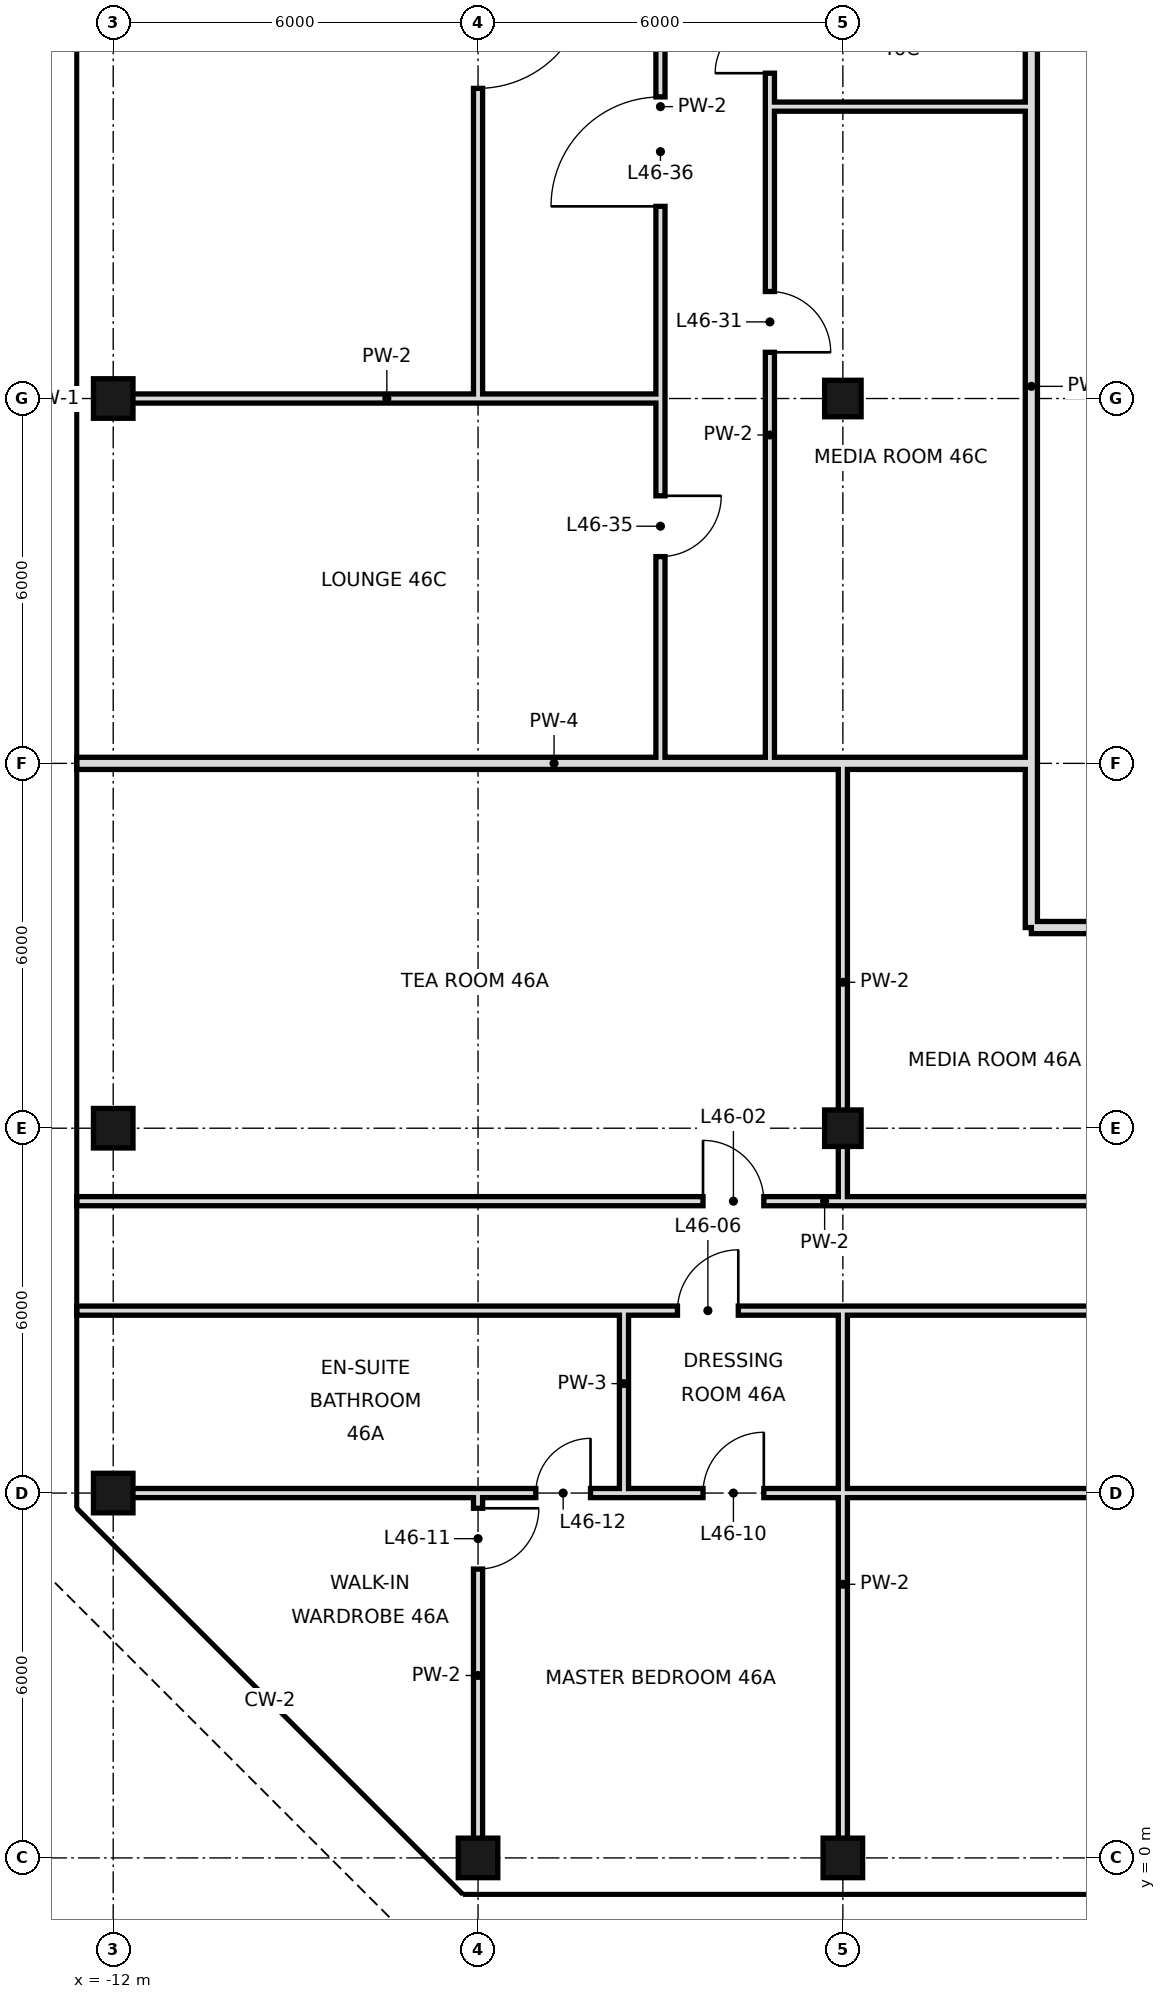
"""IFC4 building model, lengths in metres.
Left out: names, types, materials, properties, quantities, classifications, styles, units other than length and angle.
Written with IfcOpenShell. Run it as: python <this file> out.ifc"""

import sys

from ifc_helpers import new_model, si_unit, direction, frame, frame_2d, origin, origin_2d, place, context, subcontext, project, spatial, rectangle, hollow_rectangle, extrude, element, fill, save


model = new_model("IFC4")
c1 = context("Model", 3, precision=1e-05, world=origin(), true_north=direction((0.0, 1.0)))
c2 = subcontext(c1, "Body", "Model", "MODEL_VIEW")
j1 = project(units=[si_unit("LENGTHUNIT", "METRE"), si_unit("PLANEANGLEUNIT", "RADIAN")], contexts=[c1])
p1 = place(None, origin())
s1 = spatial("IfcSite", under=j1, at=p1, CompositionType="ELEMENT")
p2 = place(p1, origin())
s2 = spatial("IfcBuilding", under=s1, at=p2, CompositionType="ELEMENT")
p3 = place(p2, frame((0.0, 0.0, 199.2)))
s3 = spatial("IfcBuildingStorey", under=s2, at=p3, CompositionType="ELEMENT", Elevation=199.2)
for number, where, z_axis, x_axis in (
    (1, (-12.0, 6.0, 0.0), (0.0, 0.0, 1.0), (1.0, 0.0, 0.0)),
    (2, (-12.0, 12.0, 0.0), (0.0, 0.0, 1.0), (1.0, 0.0, 0.0)),
    (3, (-12.0, 24.0, 0.0), (0.0, 0.0, 1.0), (1.0, 0.0, 0.0)),
    (4, (-6.0, 0.0, 0.0), (0.0, 0.0, 1.0), (1.0, 0.0, 0.0)),
    (5, (0.0, 0.0, 0.0), (0.0, 0.0, 1.0), (1.0, 0.0, 0.0)),
):
    element("IfcColumn", number, at=place(p3, frame(where, z_axis=z_axis, x_axis=x_axis)), inside=s3, PredefinedType="COLUMN", context=c2, shape_type="SweptSolid", body=[
        extrude(hollow_rectangle(XDim=0.65, YDim=0.65, WallThickness=0.032, at=origin_2d()), origin(), (0.0, 0.0, 1.0), 3.6),
    ])
for number, where, z_axis, x_axis in (
    (6, (0.0, 12.0, 0.0), (0.0, 0.0, 1.0), (1.0, 0.0, 0.0)),
    (7, (0.0, 24.0, 0.0), (0.0, 0.0, 1.0), (1.0, 0.0, 0.0)),
):
    element("IfcColumn", number, at=place(p3, frame(where, z_axis=z_axis, x_axis=x_axis)), inside=s3, PredefinedType="COLUMN", context=c2, shape_type="SweptSolid", body=[
        extrude(hollow_rectangle(XDim=0.6, YDim=0.6, WallThickness=0.028, at=origin_2d()), origin(), (0.0, 0.0, 1.0), 3.6),
    ])
p4 = place(p3, frame((-1.2, 18.0, 0.0), z_axis=(0.0, 0.0, 1.0), x_axis=(0.0, 1.0, 0.0)))
e8 = element("IfcWall", 8, at=p4, inside=s3, PredefinedType="PARTITIONING", context=c2, shape_type="SweptSolid", body=[
    extrude(rectangle(XDim=10.8, YDim=0.15, at=frame_2d((5.4, 0.0))), origin(), (0.0, 0.0, 1.0), 3.42),
])
p5 = place(p4, frame((6.76, 0.0, 0.0)))
e9 = element("IfcOpeningElement", 9, at=p5, cuts=e8, PredefinedType="OPENING", context=c2, shape_type="SweptSolid", body=[
    extrude(rectangle(XDim=1.0, YDim=2.4, at=frame_2d((0.5, 1.2))), frame((0.0, 0.085, 0.0), z_axis=(0.0, -1.0, 0.0), x_axis=(1.0, 0.0, 0.0)), (0.0, 0.0, 1.0), 0.17),
])
p6 = place(p3, frame((-1.2, 28.8, 0.0), z_axis=(0.0, 0.0, 1.0), x_axis=(0.0, 1.0, 0.0)))
e10 = element("IfcWall", 10, at=p6, inside=s3, PredefinedType="PARTITIONING", context=c2, shape_type="SweptSolid", body=[
    extrude(rectangle(XDim=2.4, YDim=0.15, at=frame_2d((1.2, 0.0))), origin(), (0.0, 0.0, 1.0), 3.42),
])
p7 = place(p6, frame((0.55, 0.0, 0.0)))
e11 = element("IfcOpeningElement", 11, at=p7, cuts=e10, PredefinedType="OPENING", context=c2, shape_type="SweptSolid", body=[
    extrude(rectangle(XDim=0.9, YDim=2.4, at=frame_2d((0.45, 1.2))), frame((0.0, 0.085, 0.0), z_axis=(0.0, -1.0, 0.0), x_axis=(1.0, 0.0, 0.0)), (0.0, 0.0, 1.0), 0.17),
])
p8 = place(p3, frame((-3.0, 18.0, 0.0), z_axis=(0.0, 0.0, 1.0), x_axis=(0.0, 1.0, 0.0)))
e12 = element("IfcWall", 12, at=p8, inside=s3, PredefinedType="PARTITIONING", context=c2, shape_type="SweptSolid", body=[
    extrude(rectangle(XDim=21.6, YDim=0.15, at=frame_2d((10.8, 0.0))), origin(), (0.0, 0.0, 1.0), 3.42),
])
p9 = place(p8, frame((3.4, 0.0, 0.0)))
e13 = element("IfcOpeningElement", 13, at=p9, cuts=e12, PredefinedType="OPENING", context=c2, shape_type="SweptSolid", body=[
    extrude(rectangle(XDim=1.0, YDim=2.4, at=frame_2d((0.5, 1.2))), frame((0.0, 0.085, 0.0), z_axis=(0.0, -1.0, 0.0), x_axis=(1.0, 0.0, 0.0)), (0.0, 0.0, 1.0), 0.17),
])
p10 = place(p8, frame((9.16, 0.0, 0.0)))
e14 = element("IfcOpeningElement", 14, at=p10, cuts=e12, PredefinedType="OPENING", context=c2, shape_type="SweptSolid", body=[
    extrude(rectangle(XDim=1.8, YDim=2.4, at=frame_2d((0.9, 1.2))), frame((0.0, 0.085, 0.0), z_axis=(0.0, -1.0, 0.0), x_axis=(1.0, 0.0, 0.0)), (0.0, 0.0, 1.0), 0.17),
])
p11 = place(p8, frame((19.72, 0.0, 0.0)))
e15 = element("IfcOpeningElement", 15, at=p11, cuts=e12, PredefinedType="OPENING", context=c2, shape_type="SweptSolid", body=[
    extrude(rectangle(XDim=1.0, YDim=2.4, at=frame_2d((0.5, 1.2))), frame((0.0, 0.085, 0.0), z_axis=(0.0, -1.0, 0.0), x_axis=(1.0, 0.0, 0.0)), (0.0, 0.0, 1.0), 0.17),
])
p12 = place(p3, frame((-3.6, 6.0, 0.0), z_axis=(0.0, 0.0, 1.0), x_axis=(0.0, 1.0, 0.0)))
e16 = element("IfcWall", 16, at=p12, inside=s3, PredefinedType="PARTITIONING", context=c2, shape_type="SweptSolid", body=[
    extrude(rectangle(XDim=3.0, YDim=0.15, at=frame_2d((1.5, 0.0))), origin(), (0.0, 0.0, 1.0), 3.42),
])
p13 = place(p3, frame((-6.0, 0.0, 0.0), z_axis=(0.0, 0.0, 1.0), x_axis=(0.0, 1.0, 0.0)))
e17 = element("IfcWall", 17, at=p13, inside=s3, PredefinedType="PARTITIONING", context=c2, shape_type="SweptSolid", body=[
    extrude(rectangle(XDim=6.0, YDim=0.15, at=frame_2d((3.0, 0.0))), origin(), (0.0, 0.0, 1.0), 3.42),
])
p14 = place(p13, frame((4.75, 0.0, 0.0)))
e18 = element("IfcOpeningElement", 18, at=p14, cuts=e17, PredefinedType="OPENING", context=c2, shape_type="SweptSolid", body=[
    extrude(rectangle(XDim=1.0, YDim=2.4, at=frame_2d((0.5, 1.2))), frame((0.0, 0.085, 0.0), z_axis=(0.0, -1.0, 0.0), x_axis=(1.0, 0.0, 0.0)), (0.0, 0.0, 1.0), 0.17),
])
p15 = place(p3, frame((-6.0, 24.0, 0.0), z_axis=(0.0, 0.0, 1.0), x_axis=(0.0, 1.0, 0.0)))
e19 = element("IfcWall", 19, at=p15, inside=s3, PredefinedType="PARTITIONING", context=c2, shape_type="SweptSolid", body=[
    extrude(rectangle(XDim=15.6, YDim=0.15, at=frame_2d((7.8, 0.0))), origin(), (0.0, 0.0, 1.0), 3.42),
])
p16 = place(p15, frame((5.1, 0.0, 0.0)))
e20 = element("IfcOpeningElement", 20, at=p16, cuts=e19, PredefinedType="OPENING", context=c2, shape_type="SweptSolid", body=[
    extrude(rectangle(XDim=1.8, YDim=2.4, at=frame_2d((0.9, 1.2))), frame((0.0, 0.085, 0.0), z_axis=(0.0, -1.0, 0.0), x_axis=(1.0, 0.0, 0.0)), (0.0, 0.0, 1.0), 0.17),
])
p17 = place(p15, frame((12.88, 0.0, 0.0)))
e21 = element("IfcOpeningElement", 21, at=p17, cuts=e19, PredefinedType="OPENING", context=c2, shape_type="SweptSolid", body=[
    extrude(rectangle(XDim=1.0, YDim=2.4, at=frame_2d((0.5, 1.2))), frame((0.0, 0.085, 0.0), z_axis=(0.0, -1.0, 0.0), x_axis=(1.0, 0.0, 0.0)), (0.0, 0.0, 1.0), 0.17),
])
p18 = place(p3, frame((0.0, 0.0, 0.0), z_axis=(0.0, 0.0, 1.0), x_axis=(0.0, 1.0, 0.0)))
e22 = element("IfcWall", 22, at=p18, inside=s3, PredefinedType="PARTITIONING", context=c2, shape_type="SweptSolid", body=[
    extrude(rectangle(XDim=9.0, YDim=0.15, at=frame_2d((4.5, 0.0))), origin(), (0.0, 0.0, 1.0), 2.72),
])
p19 = place(p3, frame((0.0, 10.8, 0.0), z_axis=(0.0, 0.0, 1.0), x_axis=(0.0, 1.0, 0.0)))
e23 = element("IfcWall", 23, at=p19, inside=s3, PredefinedType="PARTITIONING", context=c2, shape_type="SweptSolid", body=[
    extrude(rectangle(XDim=7.2, YDim=0.15, at=frame_2d((3.6, 0.0))), origin(), (0.0, 0.0, 1.0), 2.72),
])
p20 = place(p3, frame((3.1, 15.3, 0.0), z_axis=(0.0, 0.0, 1.0), x_axis=(0.0, 1.0, 0.0)))
e24 = element("IfcWall", 24, at=p20, inside=s3, PredefinedType="SOLIDWALL", context=c2, shape_type="SweptSolid", body=[
    extrude(rectangle(XDim=29.1, YDim=0.2, at=frame_2d((14.55, 0.0))), origin(), (0.0, 0.0, 1.0), 2.97),
])
p21 = place(p20, frame((24.64, 0.0, 0.0)))
e25 = element("IfcOpeningElement", 25, at=p21, cuts=e24, PredefinedType="OPENING", context=c2, shape_type="SweptSolid", body=[
    extrude(rectangle(XDim=1.2, YDim=2.4, at=frame_2d((0.6, 1.2))), frame((0.0, 0.11, 0.0), z_axis=(0.0, -1.0, 0.0), x_axis=(1.0, 0.0, 0.0)), (0.0, 0.0, 1.0), 0.22),
])
p22 = place(p3, frame((-12.6, 10.8, 0.0), z_axis=(0.0, 0.0, 1.0), x_axis=(1.0, 0.0, 0.0)))
e26 = element("IfcWall", 26, at=p22, inside=s3, PredefinedType="PARTITIONING", context=c2, shape_type="SweptSolid", body=[
    extrude(rectangle(XDim=24.6, YDim=0.15, at=frame_2d((12.3, 0.0))), origin(), (0.0, 0.0, 1.0), 3.42),
])
p23 = place(p22, frame((10.3, 0.0, 0.0)))
e27 = element("IfcOpeningElement", 27, at=p23, cuts=e26, PredefinedType="OPENING", context=c2, shape_type="SweptSolid", body=[
    extrude(rectangle(XDim=1.0, YDim=2.4, at=frame_2d((0.5, 1.2))), frame((0.0, 0.085, 0.0), z_axis=(0.0, -1.0, 0.0), x_axis=(1.0, 0.0, 0.0)), (0.0, 0.0, 1.0), 0.17),
])
p24 = place(p22, frame((20.2, 0.0, 0.0)))
e28 = element("IfcOpeningElement", 28, at=p24, cuts=e26, PredefinedType="OPENING", context=c2, shape_type="SweptSolid", body=[
    extrude(rectangle(XDim=1.0, YDim=2.4, at=frame_2d((0.5, 1.2))), frame((0.0, 0.085, 0.0), z_axis=(0.0, -1.0, 0.0), x_axis=(1.0, 0.0, 0.0)), (0.0, 0.0, 1.0), 0.17),
])
p25 = place(p3, frame((3.1, 15.3, 0.0), z_axis=(0.0, 0.0, 1.0), x_axis=(1.0, 0.0, 0.0)))
e29 = element("IfcWall", 29, at=p25, inside=s3, PredefinedType="SOLIDWALL", context=c2, shape_type="SweptSolid", body=[
    extrude(rectangle(XDim=11.3, YDim=0.2, at=frame_2d((5.65, 0.0))), origin(), (0.0, 0.0, 1.0), 2.72),
])
p26 = place(p3, frame((-12.6, 18.0, 0.0), z_axis=(0.0, 0.0, 1.0), x_axis=(1.0, 0.0, 0.0)))
e30 = element("IfcWall", 30, at=p26, inside=s3, PredefinedType="SOLIDWALL", context=c2, shape_type="SweptSolid", body=[
    extrude(rectangle(XDim=15.7, YDim=0.2, at=frame_2d((7.85, 0.0))), origin(), (0.0, 0.0, 1.0), 2.72),
])
p27 = place(p3, frame((-12.0, 24.0, 0.0), z_axis=(0.0, 0.0, 1.0), x_axis=(1.0, 0.0, 0.0)))
e31 = element("IfcWall", 31, at=p27, inside=s3, PredefinedType="PARTITIONING", context=c2, shape_type="SweptSolid", body=[
    extrude(rectangle(XDim=9.0, YDim=0.15, at=frame_2d((4.5, 0.0))), origin(), (0.0, 0.0, 1.0), 2.72),
])
p28 = place(p3, frame((-1.2, 28.8, 0.0), z_axis=(0.0, 0.0, 1.0), x_axis=(1.0, 0.0, 0.0)))
e32 = element("IfcWall", 32, at=p28, inside=s3, PredefinedType="PARTITIONING", context=c2, shape_type="SweptSolid", body=[
    extrude(rectangle(XDim=4.3, YDim=0.15, at=frame_2d((2.15, 0.0))), origin(), (0.0, 0.0, 1.0), 3.42),
])
p29 = place(p3, frame((-3.6, 6.0, 0.0), z_axis=(0.0, 0.0, 1.0), x_axis=(1.0, 0.0, 0.0)))
e33 = element("IfcWall", 33, at=p29, inside=s3, PredefinedType="PARTITIONING", context=c2, shape_type="SweptSolid", body=[
    extrude(rectangle(XDim=19.2, YDim=0.15, at=frame_2d((9.6, 0.0))), origin(), (0.0, 0.0, 1.0), 2.72),
])
p30 = place(p29, frame((1.3, 0.0, 0.0)))
e34 = element("IfcOpeningElement", 34, at=p30, cuts=e33, PredefinedType="OPENING", context=c2, shape_type="SweptSolid", body=[
    extrude(rectangle(XDim=1.0, YDim=2.4, at=frame_2d((0.5, 1.2))), frame((0.0, 0.085, 0.0), z_axis=(0.0, -1.0, 0.0), x_axis=(1.0, 0.0, 0.0)), (0.0, 0.0, 1.0), 0.17),
])
p31 = place(p29, frame((10.64, 0.0, 0.0)))
e35 = element("IfcOpeningElement", 35, at=p31, cuts=e33, PredefinedType="OPENING", context=c2, shape_type="SweptSolid", body=[
    extrude(rectangle(XDim=1.8, YDim=2.4, at=frame_2d((0.9, 1.2))), frame((0.0, 0.085, 0.0), z_axis=(0.0, -1.0, 0.0), x_axis=(1.0, 0.0, 0.0)), (0.0, 0.0, 1.0), 0.17),
])
p32 = place(p29, frame((17.32, 0.0, 0.0)))
e36 = element("IfcOpeningElement", 36, at=p32, cuts=e33, PredefinedType="OPENING", context=c2, shape_type="SweptSolid", body=[
    extrude(rectangle(XDim=1.0, YDim=2.4, at=frame_2d((0.5, 1.2))), frame((0.0, 0.085, 0.0), z_axis=(0.0, -1.0, 0.0), x_axis=(1.0, 0.0, 0.0)), (0.0, 0.0, 1.0), 0.17),
])
p33 = place(p3, frame((-12.0, 6.0, 0.0), z_axis=(0.0, 0.0, 1.0), x_axis=(1.0, 0.0, 0.0)))
e37 = element("IfcWall", 37, at=p33, inside=s3, PredefinedType="PARTITIONING", context=c2, shape_type="SweptSolid", body=[
    extrude(rectangle(XDim=8.4, YDim=0.15, at=frame_2d((4.2, 0.0))), origin(), (0.0, 0.0, 1.0), 2.72),
])
p34 = place(p33, frame((6.95, 0.0, 0.0)))
e38 = element("IfcOpeningElement", 38, at=p34, cuts=e37, PredefinedType="OPENING", context=c2, shape_type="SweptSolid", body=[
    extrude(rectangle(XDim=0.9, YDim=2.4, at=frame_2d((0.45, 1.2))), frame((0.0, 0.085, 0.0), z_axis=(0.0, -1.0, 0.0), x_axis=(1.0, 0.0, 0.0)), (0.0, 0.0, 1.0), 0.17),
])
p35 = place(p3, frame((-3.6, 9.0, 0.0), z_axis=(0.0, 0.0, 1.0), x_axis=(1.0, 0.0, 0.0)))
e39 = element("IfcWall", 39, at=p35, inside=s3, PredefinedType="PARTITIONING", context=c2, shape_type="SweptSolid", body=[
    extrude(rectangle(XDim=19.2, YDim=0.15, at=frame_2d((9.6, 0.0))), origin(), (0.0, 0.0, 1.0), 3.42),
])
p36 = place(p35, frame((0.88, 0.0, 0.0)))
e40 = element("IfcOpeningElement", 40, at=p36, cuts=e39, PredefinedType="OPENING", context=c2, shape_type="SweptSolid", body=[
    extrude(rectangle(XDim=1.0, YDim=2.4, at=frame_2d((0.5, 1.2))), frame((0.0, 0.085, 0.0), z_axis=(0.0, -1.0, 0.0), x_axis=(1.0, 0.0, 0.0)), (0.0, 0.0, 1.0), 0.17),
])
p37 = place(p35, frame((8.7, 0.0, 0.0)))
e41 = element("IfcOpeningElement", 41, at=p37, cuts=e39, PredefinedType="OPENING", context=c2, shape_type="SweptSolid", body=[
    extrude(rectangle(XDim=1.8, YDim=2.4, at=frame_2d((0.9, 1.2))), frame((0.0, 0.085, 0.0), z_axis=(0.0, -1.0, 0.0), x_axis=(1.0, 0.0, 0.0)), (0.0, 0.0, 1.0), 0.17),
])
p38 = place(p35, frame((16.9, 0.0, 0.0)))
e42 = element("IfcOpeningElement", 42, at=p38, cuts=e39, PredefinedType="OPENING", context=c2, shape_type="SweptSolid", body=[
    extrude(rectangle(XDim=1.0, YDim=2.4, at=frame_2d((0.5, 1.2))), frame((0.0, 0.085, 0.0), z_axis=(0.0, -1.0, 0.0), x_axis=(1.0, 0.0, 0.0)), (0.0, 0.0, 1.0), 0.17),
])
p39 = place(p3, frame((-12.6, 9.0, 0.0), z_axis=(0.0, 0.0, 1.0), x_axis=(1.0, 0.0, 0.0)))
e43 = element("IfcWall", 43, at=p39, inside=s3, PredefinedType="PARTITIONING", context=c2, shape_type="SweptSolid", body=[
    extrude(rectangle(XDim=9.0, YDim=0.15, at=frame_2d((4.5, 0.0))), origin(), (0.0, 0.0, 1.0), 3.42),
])
p40 = place(p23, origin())
e44 = element("IfcDoor", 44, at=p40, inside=s3, OperationType="SINGLE_SWING_LEFT", PredefinedType="DOOR", context=c2, shape_type="SweptSolid", body=[
    extrude(rectangle(XDim=1.0, YDim=2.4, at=frame_2d((0.5, 1.2))), frame((0.0, 0.025, 0.0), z_axis=(0.0, -1.0, 0.0), x_axis=(1.0, 0.0, 0.0)), (0.0, 0.0, 1.0), 0.05),
])
fill(e27, e44)
p41 = place(p36, frame((1.0, 0.0, 0.0), z_axis=(0.0, 0.0, 1.0), x_axis=(-1.0, 0.0, 0.0)))
e45 = element("IfcDoor", 45, at=p41, inside=s3, OperationType="SINGLE_SWING_LEFT", PredefinedType="DOOR", context=c2, shape_type="SweptSolid", body=[
    extrude(rectangle(XDim=1.0, YDim=2.4, at=frame_2d((0.5, 1.2))), frame((0.0, 0.025, 0.0), z_axis=(0.0, -1.0, 0.0), x_axis=(1.0, 0.0, 0.0)), (0.0, 0.0, 1.0), 0.05),
])
fill(e40, e45)
p42 = place(p30, frame((1.0, 0.0, 0.0), z_axis=(0.0, 0.0, 1.0), x_axis=(-1.0, 0.0, 0.0)))
e46 = element("IfcDoor", 46, at=p42, inside=s3, OperationType="SINGLE_SWING_LEFT", PredefinedType="DOOR", context=c2, shape_type="SweptSolid", body=[
    extrude(rectangle(XDim=1.0, YDim=2.4, at=frame_2d((0.5, 1.2))), frame((0.0, 0.025, 0.0), z_axis=(0.0, -1.0, 0.0), x_axis=(1.0, 0.0, 0.0)), (0.0, 0.0, 1.0), 0.05),
])
fill(e34, e46)
p43 = place(p14, origin())
e47 = element("IfcDoor", 47, at=p43, inside=s3, OperationType="SINGLE_SWING_RIGHT", PredefinedType="DOOR", context=c2, shape_type="SweptSolid", body=[
    extrude(rectangle(XDim=1.0, YDim=2.4, at=frame_2d((0.5, 1.2))), frame((0.0, 0.025, 0.0), z_axis=(0.0, -1.0, 0.0), x_axis=(1.0, 0.0, 0.0)), (0.0, 0.0, 1.0), 0.05),
])
fill(e18, e47)
p44 = place(p34, frame((0.9, 0.0, 0.0), z_axis=(0.0, 0.0, 1.0), x_axis=(-1.0, 0.0, 0.0)))
e48 = element("IfcDoor", 48, at=p44, inside=s3, OperationType="SINGLE_SWING_LEFT", PredefinedType="DOOR", context=c2, shape_type="SweptSolid", body=[
    extrude(rectangle(XDim=0.9, YDim=2.4, at=frame_2d((0.45, 1.2))), frame((0.0, 0.025, 0.0), z_axis=(0.0, -1.0, 0.0), x_axis=(1.0, 0.0, 0.0)), (0.0, 0.0, 1.0), 0.05),
])
fill(e38, e48)
p45 = place(p5, frame((1.0, 0.0, 0.0), z_axis=(0.0, 0.0, 1.0), x_axis=(-1.0, 0.0, 0.0)))
e49 = element("IfcDoor", 49, at=p45, inside=s3, OperationType="SINGLE_SWING_RIGHT", PredefinedType="DOOR", context=c2, shape_type="SweptSolid", body=[
    extrude(rectangle(XDim=1.0, YDim=2.4, at=frame_2d((0.5, 1.2))), frame((0.0, 0.025, 0.0), z_axis=(0.0, -1.0, 0.0), x_axis=(1.0, 0.0, 0.0)), (0.0, 0.0, 1.0), 0.05),
])
fill(e9, e49)
p46 = place(p7, origin())
e50 = element("IfcDoor", 50, at=p46, inside=s3, OperationType="SINGLE_SWING_LEFT", PredefinedType="DOOR", context=c2, shape_type="SweptSolid", body=[
    extrude(rectangle(XDim=0.9, YDim=2.4, at=frame_2d((0.45, 1.2))), frame((0.0, 0.025, 0.0), z_axis=(0.0, -1.0, 0.0), x_axis=(1.0, 0.0, 0.0)), (0.0, 0.0, 1.0), 0.05),
])
fill(e11, e50)
p47 = place(p9, origin())
e51 = element("IfcDoor", 51, at=p47, inside=s3, OperationType="SINGLE_SWING_RIGHT", PredefinedType="DOOR", context=c2, shape_type="SweptSolid", body=[
    extrude(rectangle(XDim=1.0, YDim=2.4, at=frame_2d((0.5, 1.2))), frame((0.0, 0.025, 0.0), z_axis=(0.0, -1.0, 0.0), x_axis=(1.0, 0.0, 0.0)), (0.0, 0.0, 1.0), 0.05),
])
fill(e13, e51)
p48 = place(p10, origin())
e52 = element("IfcDoor", 52, at=p48, inside=s3, OperationType="SINGLE_SWING_LEFT", PredefinedType="DOOR", context=c2, shape_type="SweptSolid", body=[
    extrude(rectangle(XDim=1.8, YDim=2.4, at=frame_2d((0.9, 1.2))), frame((0.0, 0.025, 0.0), z_axis=(0.0, -1.0, 0.0), x_axis=(1.0, 0.0, 0.0)), (0.0, 0.0, 1.0), 0.05),
])
fill(e14, e52)
p49 = place(p16, origin())
e53 = element("IfcDoor", 53, at=p49, inside=s3, OperationType="SINGLE_SWING_RIGHT", PredefinedType="DOOR", context=c2, shape_type="SweptSolid", body=[
    extrude(rectangle(XDim=1.8, YDim=2.4, at=frame_2d((0.9, 1.2))), frame((0.0, 0.025, 0.0), z_axis=(0.0, -1.0, 0.0), x_axis=(1.0, 0.0, 0.0)), (0.0, 0.0, 1.0), 0.05),
])
fill(e20, e53)
save(model, sys.argv[1])
